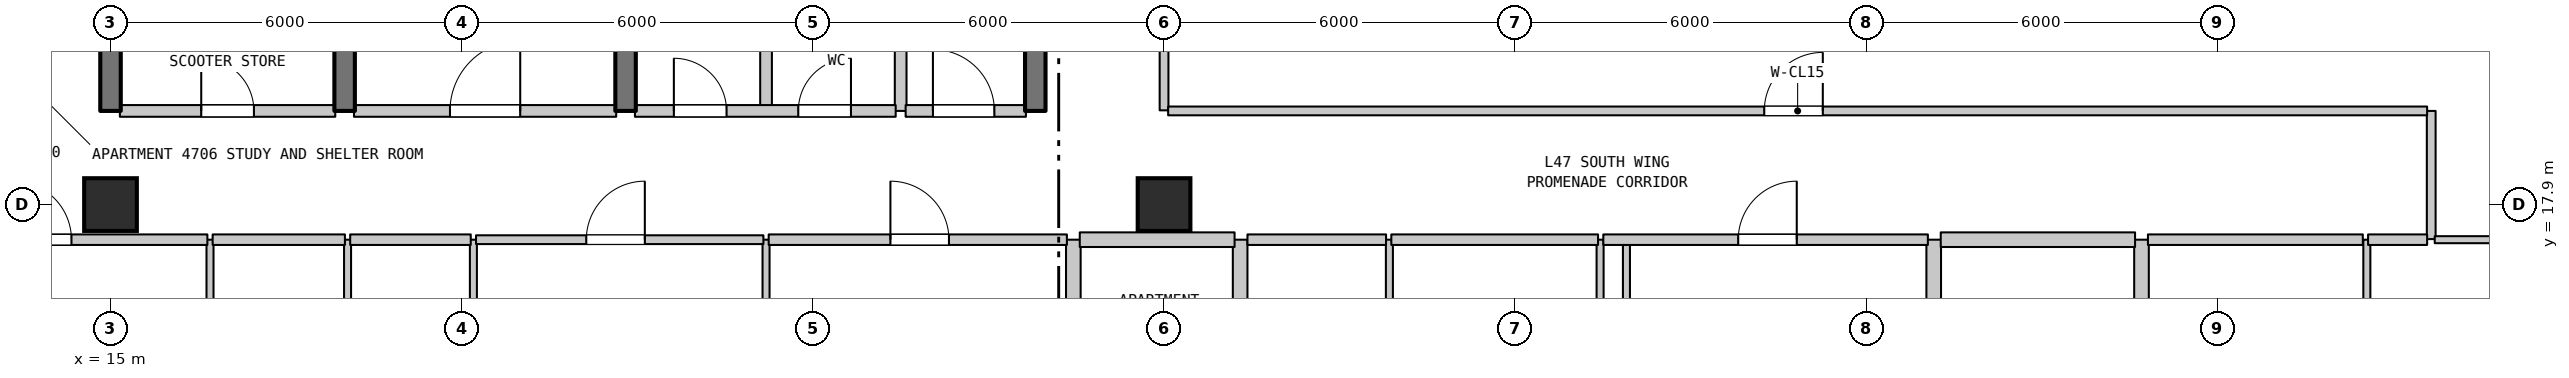
"""IFC4 building model, lengths in metres.
Left out: names, types, materials, properties, quantities, classifications, styles, units other than length and angle.
Written with IfcOpenShell. Run it as: python <this file> out.ifc"""

import sys

from ifc_helpers import new_model, si_unit, direction, frame, frame_2d, origin, origin_2d, place, context, subcontext, project, spatial, rectangle, extrude, element, fill, save


model = new_model("IFC4")
c1 = context("Model", 3, precision=1e-05, world=origin(), true_north=direction((0.0, 1.0)))
c2 = subcontext(c1, "Body", "Model", "MODEL_VIEW")
j1 = project(units=[si_unit("LENGTHUNIT", "METRE"), si_unit("PLANEANGLEUNIT", "RADIAN")], contexts=[c1])
p1 = place(None, origin())
s1 = spatial("IfcSite", under=j1, at=p1, CompositionType="ELEMENT")
p2 = place(p1, origin())
s2 = spatial("IfcBuilding", under=s1, at=p2, CompositionType="ELEMENT")
p3 = place(p2, frame((0.0, 0.0, 192.1)))
s3 = spatial("IfcBuildingStorey", under=s2, at=p3, CompositionType="ELEMENT", Elevation=192.1)
for number, where, z_axis, x_axis in (
    (1, (15.0, 17.9, 0.0), (0.0, 0.0, 1.0), (1.0, 0.0, 0.0)),
    (2, (33.0, 17.9, 0.0), (0.0, 0.0, 1.0), (1.0, 0.0, 0.0)),
):
    element("IfcColumn", number, at=place(p3, frame(where, z_axis=z_axis, x_axis=x_axis)), inside=s3, PredefinedType="COLUMN", context=c2, shape_type="SweptSolid", body=[
        extrude(rectangle(XDim=0.9, YDim=0.9, at=origin_2d()), origin(), (0.0, 0.0, 1.0), 3.7),
    ])
p4 = place(p3, frame((15.0, 19.5, 0.0), z_axis=(0.0, 0.0, 1.0), x_axis=(0.0, 1.0, 0.0)))
e3 = element("IfcWall", 3, at=p4, inside=s3, PredefinedType="SHEAR", context=c2, shape_type="SweptSolid", body=[
    extrude(rectangle(XDim=3.2, YDim=0.35, at=frame_2d((1.6, 0.0))), origin(), (0.0, 0.0, 1.0), 3.39),
])
p5 = place(p3, frame((16.7, 14.1, 0.0), z_axis=(0.0, 0.0, 1.0), x_axis=(0.0, 1.0, 0.0)))
e4 = element("IfcWall", 4, at=p5, inside=s3, PredefinedType="PARTITIONING", context=c2, shape_type="SweptSolid", body=[
    extrude(rectangle(XDim=3.2, YDim=0.12, at=frame_2d((1.6, 0.0))), origin(), (0.0, 0.0, 1.0), 3.39),
])
p6 = place(p5, frame((1.15, 0.0, 0.0)))
e5 = element("IfcOpeningElement", 5, at=p6, cuts=e4, PredefinedType="OPENING", context=c2, shape_type="SweptSolid", body=[
    extrude(rectangle(XDim=0.9, YDim=2.15, at=frame_2d((0.45, 1.075))), frame((0.0, 0.07, 0.0), z_axis=(0.0, -1.0, 0.0), x_axis=(1.0, 0.0, 0.0)), (0.0, 0.0, 1.0), 0.14),
])
p7 = place(p3, frame((19.0, 19.5, 0.0), z_axis=(0.0, 0.0, 1.0), x_axis=(0.0, 1.0, 0.0)))
e6 = element("IfcWall", 6, at=p7, inside=s3, PredefinedType="SHEAR", context=c2, shape_type="SweptSolid", body=[
    extrude(rectangle(XDim=3.2, YDim=0.35, at=frame_2d((1.6, 0.0))), origin(), (0.0, 0.0, 1.0), 3.39),
])
p8 = place(p3, frame((19.05, 14.1, 0.0), z_axis=(0.0, 0.0, 1.0), x_axis=(0.0, 1.0, 0.0)))
e7 = element("IfcWall", 7, at=p8, inside=s3, PredefinedType="PARTITIONING", context=c2, shape_type="SweptSolid", body=[
    extrude(rectangle(XDim=3.2, YDim=0.12, at=frame_2d((1.6, 0.0))), origin(), (0.0, 0.0, 1.0), 3.39),
])
p9 = place(p3, frame((21.2, 2.227, 0.0), z_axis=(0.0, 0.0, 1.0), x_axis=(0.0, 1.0, 0.0)))
e8 = element("IfcWall", 8, at=p9, inside=s3, PredefinedType="PARTITIONING", context=c2, shape_type="SweptSolid", body=[
    extrude(rectangle(XDim=15.073, YDim=0.12, at=frame_2d((7.537, 0.0))), origin(), (0.0, 0.0, 1.0), 3.39),
])
p10 = place(p3, frame((23.8, 19.5, 0.0), z_axis=(0.0, 0.0, 1.0), x_axis=(0.0, 1.0, 0.0)))
e9 = element("IfcWall", 9, at=p10, inside=s3, PredefinedType="SHEAR", context=c2, shape_type="SweptSolid", body=[
    extrude(rectangle(XDim=3.2, YDim=0.35, at=frame_2d((1.6, 0.0))), origin(), (0.0, 0.0, 1.0), 3.39),
])
p11 = place(p3, frame((26.2, 14.85, 0.0), z_axis=(0.0, 0.0, 1.0), x_axis=(0.0, 1.0, 0.0)))
e10 = element("IfcWall", 10, at=p11, inside=s3, PredefinedType="PARTITIONING", context=c2, shape_type="SweptSolid", body=[
    extrude(rectangle(XDim=2.45, YDim=0.12, at=frame_2d((1.225, 0.0))), origin(), (0.0, 0.0, 1.0), 3.39),
])
for number, where, z_axis, x_axis in (
    (11, (26.2, 19.5, 0.0), (0.0, 0.0, 1.0), (0.0, 1.0, 0.0)),
    (12, (28.5, 19.5, 0.0), (0.0, 0.0, 1.0), (0.0, 1.0, 0.0)),
):
    element("IfcWall", number, at=place(p3, frame(where, z_axis=z_axis, x_axis=x_axis)), inside=s3, PredefinedType="STANDARD", context=c2, shape_type="SweptSolid", body=[
        extrude(rectangle(XDim=3.2, YDim=0.2, at=frame_2d((1.6, 0.0))), origin(), (0.0, 0.0, 1.0), 3.39),
    ])
p12 = place(p3, frame((30.8, 19.5, 0.0), z_axis=(0.0, 0.0, 1.0), x_axis=(0.0, 1.0, 0.0)))
e13 = element("IfcWall", 13, at=p12, inside=s3, PredefinedType="SHEAR", context=c2, shape_type="SweptSolid", body=[
    extrude(rectangle(XDim=3.2, YDim=0.35, at=frame_2d((1.6, 0.0))), origin(), (0.0, 0.0, 1.0), 3.39),
])
p13 = place(p3, frame((31.45, 11.15, 0.0), z_axis=(0.0, 0.0, 1.0), x_axis=(0.0, 1.0, 0.0)))
e14 = element("IfcWall", 14, at=p13, inside=s3, PredefinedType="STANDARD", context=c2, shape_type="SweptSolid", body=[
    extrude(rectangle(XDim=6.15, YDim=0.25, at=frame_2d((3.075, 0.0))), origin(), (0.0, 0.0, 1.0), 3.39),
])
p14 = place(p13, frame((2.529, 0.0, 0.0)))
e15 = element("IfcOpeningElement", 15, at=p14, cuts=e14, PredefinedType="OPENING", context=c2, shape_type="SweptSolid", body=[
    extrude(rectangle(XDim=0.95, YDim=2.15, at=frame_2d((0.475, 1.075))), frame((0.0, 0.135, 0.0), z_axis=(0.0, -1.0, 0.0), x_axis=(1.0, 0.0, 0.0)), (0.0, 0.0, 1.0), 0.27),
])
p15 = place(p3, frame((33.0, 19.51, 0.0), z_axis=(0.0, 0.0, 1.0), x_axis=(0.0, 1.0, 0.0)))
e16 = element("IfcWall", 16, at=p15, inside=s3, PredefinedType="STANDARD", context=c2, shape_type="SweptSolid", body=[
    extrude(rectangle(XDim=5.35, YDim=0.15, at=frame_2d((2.675, 0.0))), origin(), (0.0, 0.0, 1.0), 2.99),
])
p16 = place(p15, frame((1.534, 0.0, 0.0)))
e17 = element("IfcOpeningElement", 17, at=p16, cuts=e16, PredefinedType="OPENING", context=c2, shape_type="SweptSolid", body=[
    extrude(rectangle(XDim=1.0, YDim=2.15, at=frame_2d((0.5, 1.075))), frame((0.0, 0.085, 0.0), z_axis=(0.0, -1.0, 0.0), x_axis=(1.0, 0.0, 0.0)), (0.0, 0.0, 1.0), 0.17),
])
p17 = place(p3, frame((34.3, 11.15, 0.0), z_axis=(0.0, 0.0, 1.0), x_axis=(0.0, 1.0, 0.0)))
e18 = element("IfcWall", 18, at=p17, inside=s3, PredefinedType="STANDARD", context=c2, shape_type="SweptSolid", body=[
    extrude(rectangle(XDim=6.15, YDim=0.25, at=frame_2d((3.075, 0.0))), origin(), (0.0, 0.0, 1.0), 3.39),
])
for number, where, z_axis, x_axis in (
    (19, (36.85, 11.15, 0.0), (0.0, 0.0, 1.0), (0.0, 1.0, 0.0)),
    (20, (40.45, 11.15, 0.0), (0.0, 0.0, 1.0), (0.0, 1.0, 0.0)),
):
    element("IfcWall", number, at=place(p3, frame(where, z_axis=z_axis, x_axis=x_axis)), inside=s3, PredefinedType="PARTITIONING", context=c2, shape_type="SweptSolid", body=[
        extrude(rectangle(XDim=6.15, YDim=0.12, at=frame_2d((3.075, 0.0))), origin(), (0.0, 0.0, 1.0), 3.39),
    ])
p18 = place(p3, frame((40.9, 14.85, 0.0), z_axis=(0.0, 0.0, 1.0), x_axis=(0.0, 1.0, 0.0)))
e21 = element("IfcWall", 21, at=p18, inside=s3, PredefinedType="PARTITIONING", context=c2, shape_type="SweptSolid", body=[
    extrude(rectangle(XDim=2.45, YDim=0.12, at=frame_2d((1.225, 0.0))), origin(), (0.0, 0.0, 1.0), 3.39),
])
for number, where, z_axis, x_axis in (
    (22, (46.15, 11.15, 0.0), (0.0, 0.0, 1.0), (0.0, 1.0, 0.0)),
    (23, (49.7, 11.15, 0.0), (0.0, 0.0, 1.0), (0.0, 1.0, 0.0)),
):
    element("IfcWall", number, at=place(p3, frame(where, z_axis=z_axis, x_axis=x_axis)), inside=s3, PredefinedType="STANDARD", context=c2, shape_type="SweptSolid", body=[
        extrude(rectangle(XDim=6.15, YDim=0.25, at=frame_2d((3.075, 0.0))), origin(), (0.0, 0.0, 1.0), 3.39),
    ])
p19 = place(p3, frame((53.55, 11.15, 0.0), z_axis=(0.0, 0.0, 1.0), x_axis=(0.0, 1.0, 0.0)))
e24 = element("IfcWall", 24, at=p19, inside=s3, PredefinedType="PARTITIONING", context=c2, shape_type="SweptSolid", body=[
    extrude(rectangle(XDim=6.15, YDim=0.12, at=frame_2d((3.075, 0.0))), origin(), (0.0, 0.0, 1.0), 3.39),
])
p20 = place(p3, frame((54.65, 17.31, 0.0), z_axis=(0.0, 0.0, 1.0), x_axis=(0.0, 1.0, 0.0)))
e25 = element("IfcWall", 25, at=p20, inside=s3, PredefinedType="STANDARD", context=c2, shape_type="SweptSolid", body=[
    extrude(rectangle(XDim=2.19, YDim=0.15, at=frame_2d((1.095, 0.0))), origin(), (0.0, 0.0, 1.0), 3.39),
])
p21 = place(p3, frame((12.875, 17.3, 0.0), z_axis=(0.0, 0.0, 1.0), x_axis=(1.0, 0.0, 0.0)))
e26 = element("IfcWall", 26, at=p21, inside=s3, PredefinedType="STANDARD", context=c2, shape_type="SweptSolid", body=[
    extrude(rectangle(XDim=3.78, YDim=0.18, at=frame_2d((1.89, 0.0))), origin(), (0.0, 0.0, 1.0), 3.39),
])
p22 = place(p21, frame((0.458, 0.0, 0.0)))
e27 = element("IfcOpeningElement", 27, at=p22, cuts=e26, PredefinedType="OPENING", context=c2, shape_type="SweptSolid", body=[
    extrude(rectangle(XDim=1.0, YDim=2.15, at=frame_2d((0.5, 1.075))), frame((0.0, 0.1, 0.0), z_axis=(0.0, -1.0, 0.0), x_axis=(1.0, 0.0, 0.0)), (0.0, 0.0, 1.0), 0.2),
])
p23 = place(p3, frame((16.745, 17.3, 0.0), z_axis=(0.0, 0.0, 1.0), x_axis=(1.0, 0.0, 0.0)))
e28 = element("IfcWall", 28, at=p23, inside=s3, PredefinedType="STANDARD", context=c2, shape_type="SweptSolid", body=[
    extrude(rectangle(XDim=2.26, YDim=0.18, at=frame_2d((1.13, 0.0))), origin(), (0.0, 0.0, 1.0), 3.39),
])
p24 = place(p3, frame((19.095, 17.3, 0.0), z_axis=(0.0, 0.0, 1.0), x_axis=(1.0, 0.0, 0.0)))
e29 = element("IfcWall", 29, at=p24, inside=s3, PredefinedType="STANDARD", context=c2, shape_type="SweptSolid", body=[
    extrude(rectangle(XDim=2.06, YDim=0.18, at=frame_2d((1.03, 0.0))), origin(), (0.0, 0.0, 1.0), 3.39),
])
p25 = place(p3, frame((21.245, 17.3, 0.0), z_axis=(0.0, 0.0, 1.0), x_axis=(1.0, 0.0, 0.0)))
e30 = element("IfcWall", 30, at=p25, inside=s3, PredefinedType="STANDARD", context=c2, shape_type="SweptSolid", body=[
    extrude(rectangle(XDim=4.91, YDim=0.15, at=frame_2d((2.455, 0.0))), origin(), (0.0, 0.0, 1.0), 3.39),
])
p26 = place(p25, frame((1.884, 0.0, 0.0)))
e31 = element("IfcOpeningElement", 31, at=p26, cuts=e30, PredefinedType="OPENING", context=c2, shape_type="SweptSolid", body=[
    extrude(rectangle(XDim=1.0, YDim=2.15, at=frame_2d((0.5, 1.075))), frame((0.0, 0.085, 0.0), z_axis=(0.0, -1.0, 0.0), x_axis=(1.0, 0.0, 0.0)), (0.0, 0.0, 1.0), 0.17),
])
p27 = place(p3, frame((26.245, 17.3, 0.0), z_axis=(0.0, 0.0, 1.0), x_axis=(1.0, 0.0, 0.0)))
e32 = element("IfcWall", 32, at=p27, inside=s3, PredefinedType="STANDARD", context=c2, shape_type="SweptSolid", body=[
    extrude(rectangle(XDim=5.095, YDim=0.18, at=frame_2d((2.547, 0.0))), origin(), (0.0, 0.0, 1.0), 3.39),
])
p28 = place(p27, frame((2.08, 0.0, 0.0)))
e33 = element("IfcOpeningElement", 33, at=p28, cuts=e32, PredefinedType="OPENING", context=c2, shape_type="SweptSolid", body=[
    extrude(rectangle(XDim=1.0, YDim=2.15, at=frame_2d((0.5, 1.075))), frame((0.0, 0.1, 0.0), z_axis=(0.0, -1.0, 0.0), x_axis=(1.0, 0.0, 0.0)), (0.0, 0.0, 1.0), 0.2),
])
p29 = place(p3, frame((31.56, 17.3, 0.0), z_axis=(0.0, 0.0, 1.0), x_axis=(1.0, 0.0, 0.0)))
e34 = element("IfcWall", 34, at=p29, inside=s3, PredefinedType="STANDARD", context=c2, shape_type="SweptSolid", body=[
    extrude(rectangle(XDim=2.645, YDim=0.25, at=frame_2d((1.323, 0.0))), origin(), (0.0, 0.0, 1.0), 3.39),
])
p30 = place(p3, frame((34.425, 17.3, 0.0), z_axis=(0.0, 0.0, 1.0), x_axis=(1.0, 0.0, 0.0)))
e35 = element("IfcWall", 35, at=p30, inside=s3, PredefinedType="STANDARD", context=c2, shape_type="SweptSolid", body=[
    extrude(rectangle(XDim=2.368, YDim=0.18, at=frame_2d((1.184, 0.0))), origin(), (0.0, 0.0, 1.0), 3.39),
])
p31 = place(p3, frame((36.883, 17.3, 0.0), z_axis=(0.0, 0.0, 1.0), x_axis=(1.0, 0.0, 0.0)))
e36 = element("IfcWall", 36, at=p31, inside=s3, PredefinedType="STANDARD", context=c2, shape_type="SweptSolid", body=[
    extrude(rectangle(XDim=3.532, YDim=0.18, at=frame_2d((1.766, 0.0))), origin(), (0.0, 0.0, 1.0), 3.39),
])
p32 = place(p3, frame((40.505, 17.3, 0.0), z_axis=(0.0, 0.0, 1.0), x_axis=(1.0, 0.0, 0.0)))
e37 = element("IfcWall", 37, at=p32, inside=s3, PredefinedType="STANDARD", context=c2, shape_type="SweptSolid", body=[
    extrude(rectangle(XDim=5.545, YDim=0.18, at=frame_2d((2.772, 0.0))), origin(), (0.0, 0.0, 1.0), 3.39),
])
p33 = place(p32, frame((2.305, 0.0, 0.0)))
e38 = element("IfcOpeningElement", 38, at=p33, cuts=e37, PredefinedType="OPENING", context=c2, shape_type="SweptSolid", body=[
    extrude(rectangle(XDim=1.0, YDim=2.15, at=frame_2d((0.5, 1.075))), frame((0.0, 0.1, 0.0), z_axis=(0.0, -1.0, 0.0), x_axis=(1.0, 0.0, 0.0)), (0.0, 0.0, 1.0), 0.2),
])
p34 = place(p3, frame((46.27, 17.3, 0.0), z_axis=(0.0, 0.0, 1.0), x_axis=(1.0, 0.0, 0.0)))
e39 = element("IfcWall", 39, at=p34, inside=s3, PredefinedType="STANDARD", context=c2, shape_type="SweptSolid", body=[
    extrude(rectangle(XDim=3.32, YDim=0.25, at=frame_2d((1.66, 0.0))), origin(), (0.0, 0.0, 1.0), 3.39),
])
p35 = place(p3, frame((49.81, 17.3, 0.0), z_axis=(0.0, 0.0, 1.0), x_axis=(1.0, 0.0, 0.0)))
e40 = element("IfcWall", 40, at=p35, inside=s3, PredefinedType="STANDARD", context=c2, shape_type="SweptSolid", body=[
    extrude(rectangle(XDim=3.671, YDim=0.18, at=frame_2d((1.835, 0.0))), origin(), (0.0, 0.0, 1.0), 3.39),
])
p36 = place(p3, frame((53.571, 17.3, 0.0), z_axis=(0.0, 0.0, 1.0), x_axis=(1.0, 0.0, 0.0)))
e41 = element("IfcWall", 41, at=p36, inside=s3, PredefinedType="STANDARD", context=c2, shape_type="SweptSolid", body=[
    extrude(rectangle(XDim=1.009, YDim=0.18, at=frame_2d((0.504, 0.0))), origin(), (0.0, 0.0, 1.0), 3.39),
])
p37 = place(p3, frame((54.71, 17.3, 0.0), z_axis=(0.0, 0.0, 1.0), x_axis=(1.0, 0.0, 0.0)))
e42 = element("IfcWall", 42, at=p37, inside=s3, PredefinedType="PARTITIONING", context=c2, shape_type="SweptSolid", body=[
    extrude(rectangle(XDim=1.635, YDim=0.12, at=frame_2d((0.817, 0.0))), origin(), (0.0, 0.0, 1.0), 3.39),
])
p38 = place(p3, frame((15.16, 19.5, 0.0), z_axis=(0.0, 0.0, 1.0), x_axis=(1.0, 0.0, 0.0)))
e43 = element("IfcWall", 43, at=p38, inside=s3, PredefinedType="STANDARD", context=c2, shape_type="SweptSolid", body=[
    extrude(rectangle(XDim=3.68, YDim=0.2, at=frame_2d((1.84, 0.0))), origin(), (0.0, 0.0, 1.0), 3.39),
])
p39 = place(p38, frame((1.39, 0.0, 0.0)))
e44 = element("IfcOpeningElement", 44, at=p39, cuts=e43, PredefinedType="OPENING", context=c2, shape_type="SweptSolid", body=[
    extrude(rectangle(XDim=0.9, YDim=2.15, at=frame_2d((0.45, 1.075))), frame((0.0, 0.11, 0.0), z_axis=(0.0, -1.0, 0.0), x_axis=(1.0, 0.0, 0.0)), (0.0, 0.0, 1.0), 0.22),
])
p40 = place(p3, frame((19.16, 19.5, 0.0), z_axis=(0.0, 0.0, 1.0), x_axis=(1.0, 0.0, 0.0)))
e45 = element("IfcWall", 45, at=p40, inside=s3, PredefinedType="STANDARD", context=c2, shape_type="SweptSolid", body=[
    extrude(rectangle(XDim=4.48, YDim=0.2, at=frame_2d((2.24, 0.0))), origin(), (0.0, 0.0, 1.0), 3.39),
])
p41 = place(p40, frame((1.64, 0.0, 0.0)))
e46 = element("IfcOpeningElement", 46, at=p41, cuts=e45, PredefinedType="OPENING", context=c2, shape_type="SweptSolid", body=[
    extrude(rectangle(XDim=1.2, YDim=2.2, at=frame_2d((0.6, 1.1))), frame((0.0, 0.11, 0.0), z_axis=(0.0, -1.0, 0.0), x_axis=(1.0, 0.0, 0.0)), (0.0, 0.0, 1.0), 0.22),
])
p42 = place(p3, frame((23.96, 19.5, 0.0), z_axis=(0.0, 0.0, 1.0), x_axis=(1.0, 0.0, 0.0)))
e47 = element("IfcWall", 47, at=p42, inside=s3, PredefinedType="STANDARD", context=c2, shape_type="SweptSolid", body=[
    extrude(rectangle(XDim=4.455, YDim=0.2, at=frame_2d((2.228, 0.0))), origin(), (0.0, 0.0, 1.0), 3.39),
])
p43 = place(p42, frame((0.665, 0.0, 0.0)))
e48 = element("IfcOpeningElement", 48, at=p43, cuts=e47, PredefinedType="OPENING", context=c2, shape_type="SweptSolid", body=[
    extrude(rectangle(XDim=0.9, YDim=2.15, at=frame_2d((0.45, 1.075))), frame((0.0, 0.11, 0.0), z_axis=(0.0, -1.0, 0.0), x_axis=(1.0, 0.0, 0.0)), (0.0, 0.0, 1.0), 0.22),
])
p44 = place(p42, frame((2.791, 0.0, 0.0)))
e49 = element("IfcOpeningElement", 49, at=p44, cuts=e47, PredefinedType="OPENING", context=c2, shape_type="SweptSolid", body=[
    extrude(rectangle(XDim=0.9, YDim=2.15, at=frame_2d((0.45, 1.075))), frame((0.0, 0.11, 0.0), z_axis=(0.0, -1.0, 0.0), x_axis=(1.0, 0.0, 0.0)), (0.0, 0.0, 1.0), 0.22),
])
p45 = place(p3, frame((28.585, 19.5, 0.0), z_axis=(0.0, 0.0, 1.0), x_axis=(1.0, 0.0, 0.0)))
e50 = element("IfcWall", 50, at=p45, inside=s3, PredefinedType="STANDARD", context=c2, shape_type="SweptSolid", body=[
    extrude(rectangle(XDim=2.055, YDim=0.2, at=frame_2d((1.027, 0.0))), origin(), (0.0, 0.0, 1.0), 3.39),
])
p46 = place(p45, frame((0.466, 0.0, 0.0)))
e51 = element("IfcOpeningElement", 51, at=p46, cuts=e50, PredefinedType="OPENING", context=c2, shape_type="SweptSolid", body=[
    extrude(rectangle(XDim=1.05, YDim=2.15, at=frame_2d((0.525, 1.075))), frame((0.0, 0.11, 0.0), z_axis=(0.0, -1.0, 0.0), x_axis=(1.0, 0.0, 0.0)), (0.0, 0.0, 1.0), 0.22),
])
p47 = place(p3, frame((33.07, 19.5, 0.0), z_axis=(0.0, 0.0, 1.0), x_axis=(1.0, 0.0, 0.0)))
e52 = element("IfcWall", 52, at=p47, inside=s3, PredefinedType="STANDARD", context=c2, shape_type="SweptSolid", body=[
    extrude(rectangle(XDim=21.51, YDim=0.15, at=frame_2d((10.755, 0.0))), origin(), (0.0, 0.0, 1.0), 3.39),
])
p48 = place(p47, frame((10.185, 0.0, 0.0)))
e53 = element("IfcOpeningElement", 53, at=p48, cuts=e52, PredefinedType="OPENING", context=c2, shape_type="SweptSolid", body=[
    extrude(rectangle(XDim=1.0, YDim=2.15, at=frame_2d((0.5, 1.075))), frame((0.0, 0.085, 0.0), z_axis=(0.0, -1.0, 0.0), x_axis=(1.0, 0.0, 0.0)), (0.0, 0.0, 1.0), 0.17),
])
p49 = place(p22, origin())
e54 = element("IfcDoor", 54, at=p49, inside=s3, OperationType="SINGLE_SWING_LEFT", PredefinedType="DOOR", context=c2, shape_type="SweptSolid", body=[
    extrude(rectangle(XDim=1.0, YDim=2.15, at=frame_2d((0.5, 1.075))), frame((0.0, 0.025, 0.0), z_axis=(0.0, -1.0, 0.0), x_axis=(1.0, 0.0, 0.0)), (0.0, 0.0, 1.0), 0.05),
])
fill(e27, e54)
p50 = place(p26, origin())
e55 = element("IfcDoor", 55, at=p50, inside=s3, OperationType="SINGLE_SWING_RIGHT", PredefinedType="DOOR", context=c2, shape_type="SweptSolid", body=[
    extrude(rectangle(XDim=1.0, YDim=2.15, at=frame_2d((0.5, 1.075))), frame((0.0, 0.025, 0.0), z_axis=(0.0, -1.0, 0.0), x_axis=(1.0, 0.0, 0.0)), (0.0, 0.0, 1.0), 0.05),
])
fill(e31, e55)
p51 = place(p28, origin())
e56 = element("IfcDoor", 56, at=p51, inside=s3, OperationType="SINGLE_SWING_LEFT", PredefinedType="DOOR", context=c2, shape_type="SweptSolid", body=[
    extrude(rectangle(XDim=1.0, YDim=2.15, at=frame_2d((0.5, 1.075))), frame((0.0, 0.025, 0.0), z_axis=(0.0, -1.0, 0.0), x_axis=(1.0, 0.0, 0.0)), (0.0, 0.0, 1.0), 0.05),
])
fill(e33, e56)
p52 = place(p33, origin())
e57 = element("IfcDoor", 57, at=p52, inside=s3, OperationType="SINGLE_SWING_RIGHT", PredefinedType="DOOR", context=c2, shape_type="SweptSolid", body=[
    extrude(rectangle(XDim=1.0, YDim=2.15, at=frame_2d((0.5, 1.075))), frame((0.0, 0.025, 0.0), z_axis=(0.0, -1.0, 0.0), x_axis=(1.0, 0.0, 0.0)), (0.0, 0.0, 1.0), 0.05),
])
fill(e38, e57)
p53 = place(p39, origin())
e58 = element("IfcDoor", 58, at=p53, inside=s3, OperationType="SINGLE_SWING_LEFT", PredefinedType="DOOR", context=c2, shape_type="SweptSolid", body=[
    extrude(rectangle(XDim=0.9, YDim=2.15, at=frame_2d((0.45, 1.075))), frame((0.0, 0.025, 0.0), z_axis=(0.0, -1.0, 0.0), x_axis=(1.0, 0.0, 0.0)), (0.0, 0.0, 1.0), 0.05),
])
fill(e44, e58)
p54 = place(p41, origin())
e59 = element("IfcDoor", 59, at=p54, inside=s3, OperationType="SINGLE_SWING_RIGHT", PredefinedType="DOOR", context=c2, shape_type="SweptSolid", body=[
    extrude(rectangle(XDim=1.2, YDim=2.2, at=frame_2d((0.6, 1.1))), frame((0.0, 0.025, 0.0), z_axis=(0.0, -1.0, 0.0), x_axis=(1.0, 0.0, 0.0)), (0.0, 0.0, 1.0), 0.05),
])
fill(e46, e59)
p55 = place(p43, origin())
e60 = element("IfcDoor", 60, at=p55, inside=s3, OperationType="SINGLE_SWING_LEFT", PredefinedType="DOOR", context=c2, shape_type="SweptSolid", body=[
    extrude(rectangle(XDim=0.9, YDim=2.15, at=frame_2d((0.45, 1.075))), frame((0.0, 0.025, 0.0), z_axis=(0.0, -1.0, 0.0), x_axis=(1.0, 0.0, 0.0)), (0.0, 0.0, 1.0), 0.05),
])
fill(e48, e60)
p56 = place(p44, origin())
e61 = element("IfcDoor", 61, at=p56, inside=s3, OperationType="SINGLE_SWING_RIGHT", PredefinedType="DOOR", context=c2, shape_type="SweptSolid", body=[
    extrude(rectangle(XDim=0.9, YDim=2.15, at=frame_2d((0.45, 1.075))), frame((0.0, 0.025, 0.0), z_axis=(0.0, -1.0, 0.0), x_axis=(1.0, 0.0, 0.0)), (0.0, 0.0, 1.0), 0.05),
])
fill(e49, e61)
p57 = place(p46, origin())
e62 = element("IfcDoor", 62, at=p57, inside=s3, OperationType="SINGLE_SWING_LEFT", PredefinedType="DOOR", context=c2, shape_type="SweptSolid", body=[
    extrude(rectangle(XDim=1.05, YDim=2.15, at=frame_2d((0.525, 1.075))), frame((0.0, 0.025, 0.0), z_axis=(0.0, -1.0, 0.0), x_axis=(1.0, 0.0, 0.0)), (0.0, 0.0, 1.0), 0.05),
])
fill(e51, e62)
p58 = place(p48, origin())
e63 = element("IfcDoor", 63, at=p58, inside=s3, OperationType="SINGLE_SWING_RIGHT", PredefinedType="DOOR", context=c2, shape_type="SweptSolid", body=[
    extrude(rectangle(XDim=1.0, YDim=2.15, at=frame_2d((0.5, 1.075))), frame((0.0, 0.025, 0.0), z_axis=(0.0, -1.0, 0.0), x_axis=(1.0, 0.0, 0.0)), (0.0, 0.0, 1.0), 0.05),
])
fill(e53, e63)
save(model, sys.argv[1])
